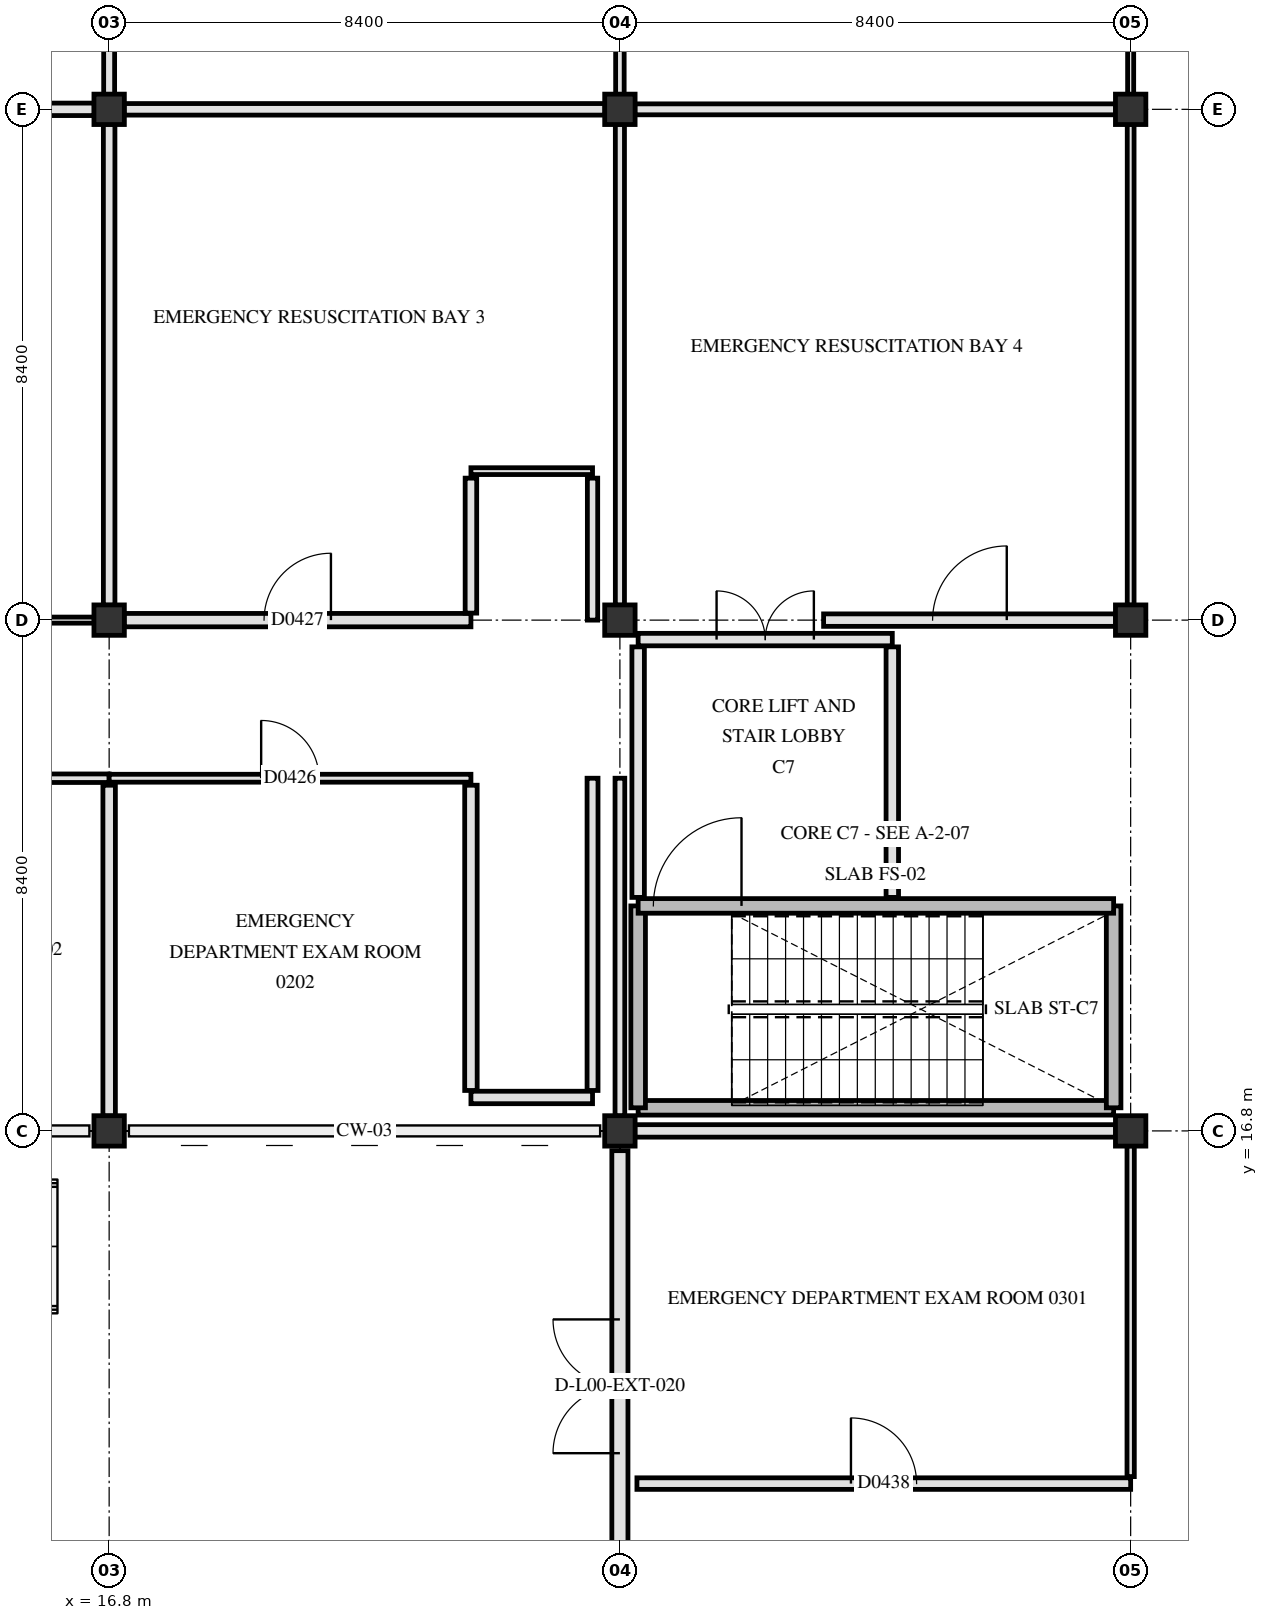
"""IFC4 building model, lengths in metres.
Left out: names, types, materials, properties, quantities, classifications, styles, units other than length and angle.
Written with IfcOpenShell. Run it as: python <this file> out.ifc"""

import sys

from ifc_helpers import new_model, si_unit, direction, frame, frame_2d, origin, origin_2d, place, context, subcontext, project, spatial, rectangle, extrude, element, fill, save


model = new_model("IFC4")
c1 = context("Model", 3, precision=1e-05, world=origin(), true_north=direction((0.0, 1.0)))
c2 = subcontext(c1, "Body", "Model", "MODEL_VIEW")
j1 = project(units=[si_unit("LENGTHUNIT", "METRE"), si_unit("PLANEANGLEUNIT", "RADIAN")], contexts=[c1])
p1 = place(None, origin())
s1 = spatial("IfcSite", under=j1, at=p1, CompositionType="ELEMENT")
p2 = place(p1, origin())
s2 = spatial("IfcBuilding", under=s1, at=p2, CompositionType="ELEMENT")
p3 = place(p2, origin())
s3 = spatial("IfcBuildingStorey", under=s2, at=p3, CompositionType="ELEMENT", Elevation=0.0)
for number, where, z_axis, x_axis in (
    (1, (16.8, 16.8, 0.0), (0.0, 0.0, 1.0), (1.0, 0.0, 0.0)),
    (2, (16.8, 25.2, 0.0), (0.0, 0.0, 1.0), (1.0, 0.0, 0.0)),
    (3, (16.8, 33.6, 0.0), (0.0, 0.0, 1.0), (1.0, 0.0, 0.0)),
    (4, (25.2, 16.8, 0.0), (0.0, 0.0, 1.0), (1.0, 0.0, 0.0)),
    (5, (25.2, 25.2, 0.0), (0.0, 0.0, 1.0), (1.0, 0.0, 0.0)),
    (6, (25.2, 33.6, 0.0), (0.0, 0.0, 1.0), (1.0, 0.0, 0.0)),
    (7, (33.6, 16.8, 0.0), (0.0, 0.0, 1.0), (1.0, 0.0, 0.0)),
    (8, (33.6, 25.2, 0.0), (0.0, 0.0, 1.0), (1.0, 0.0, 0.0)),
    (9, (33.6, 33.6, 0.0), (0.0, 0.0, 1.0), (1.0, 0.0, 0.0)),
):
    element("IfcColumn", number, at=place(p3, frame(where, z_axis=z_axis, x_axis=x_axis)), inside=s3, PredefinedType="COLUMN", context=c2, shape_type="SweptSolid", body=[
        extrude(rectangle(XDim=0.5, YDim=0.5, at=origin_2d()), origin(), (0.0, 0.0, 1.0), 4.8),
    ])
p4 = place(p3, frame((25.2, 8.725, 0.0), z_axis=(0.0, 0.0, 1.0), x_axis=(0.0, 1.0, 0.0)))
e10 = element("IfcWall", 10, at=p4, inside=s3, PredefinedType="SOLIDWALL", context=c2, shape_type="SweptSolid", body=[
    extrude(rectangle(XDim=7.75, YDim=0.265, at=frame_2d((3.875, 0.0))), origin(), (0.0, 0.0, 1.0), 2.99),
])
p5 = place(p4, frame((2.775, 0.0, 0.0)))
e11 = element("IfcOpeningElement", 11, at=p5, cuts=e10, PredefinedType="OPENING", context=c2, shape_type="SweptSolid", body=[
    extrude(rectangle(XDim=2.2, YDim=2.35, at=frame_2d((1.1, 1.175))), frame((0.0, 0.142, 0.0), z_axis=(0.0, -1.0, 0.0), x_axis=(1.0, 0.0, 0.0)), (0.0, 0.0, 1.0), 0.285),
])
p6 = place(p3, frame((25.5, 17.18, 0.0), z_axis=(0.0, 0.0, 1.0), x_axis=(1.0, 0.0, 0.0)))
e12 = element("IfcWall", 12, at=p6, inside=s3, PredefinedType="SHEAR", context=c2, shape_type="SweptSolid", body=[
    extrude(rectangle(XDim=7.82, YDim=0.24, at=frame_2d((3.91, 0.0))), origin(), (0.0, 0.0, 1.0), 4.5),
])
for number, where, z_axis, x_axis in (
    (13, (25.5, 17.18, 0.0), (0.0, 0.0, 1.0), (0.0, 1.0, 0.0)),
    (14, (33.32, 17.18, 0.0), (0.0, 0.0, 1.0), (0.0, 1.0, 0.0)),
):
    element("IfcWall", number, at=place(p3, frame(where, z_axis=z_axis, x_axis=x_axis)), inside=s3, PredefinedType="SHEAR", context=c2, shape_type="SweptSolid", body=[
        extrude(rectangle(XDim=3.32, YDim=0.24, at=frame_2d((1.66, 0.0))), origin(), (0.0, 0.0, 1.0), 4.5),
    ])
p7 = place(p3, frame((25.5, 20.5, 0.0), z_axis=(0.0, 0.0, 1.0), x_axis=(1.0, 0.0, 0.0)))
e15 = element("IfcWall", 15, at=p7, inside=s3, PredefinedType="SHEAR", context=c2, shape_type="SweptSolid", body=[
    extrude(rectangle(XDim=7.82, YDim=0.24, at=frame_2d((3.91, 0.0))), origin(), (0.0, 0.0, 1.0), 4.5),
])
p8 = place(p7, frame((0.25, 0.0, 0.0)))
e16 = element("IfcOpeningElement", 16, at=p8, cuts=e15, PredefinedType="OPENING", context=c2, shape_type="SweptSolid", body=[
    extrude(rectangle(XDim=1.45, YDim=2.2, at=frame_2d((0.725, 1.1))), frame((0.0, 0.13, 0.0), z_axis=(0.0, -1.0, 0.0), x_axis=(1.0, 0.0, 0.0)), (0.0, 0.0, 1.0), 0.26),
])
p9 = place(p3, frame((29.68, 20.64, 0.0), z_axis=(0.0, 0.0, 1.0), x_axis=(0.0, 1.0, 0.0)))
e17 = element("IfcWall", 17, at=p9, inside=s3, PredefinedType="PARTITIONING", context=c2, shape_type="SweptSolid", body=[
    extrude(rectangle(XDim=4.12, YDim=0.205, at=frame_2d((2.06, 0.0))), origin(), (0.0, 0.0, 1.0), 4.49),
])
p10 = place(p3, frame((25.5, 20.64, 0.0), z_axis=(0.0, 0.0, 1.0), x_axis=(0.0, 1.0, 0.0)))
e18 = element("IfcWall", 18, at=p10, inside=s3, PredefinedType="PARTITIONING", context=c2, shape_type="SweptSolid", body=[
    extrude(rectangle(XDim=4.12, YDim=0.205, at=frame_2d((2.06, 0.0))), origin(), (0.0, 0.0, 1.0), 3.89),
])
p11 = place(p3, frame((25.5, 24.88, 0.0), z_axis=(0.0, 0.0, 1.0), x_axis=(1.0, 0.0, 0.0)))
e19 = element("IfcWall", 19, at=p11, inside=s3, PredefinedType="PARTITIONING", context=c2, shape_type="SweptSolid", body=[
    extrude(rectangle(XDim=4.18, YDim=0.205, at=frame_2d((2.09, 0.0))), origin(), (0.0, 0.0, 1.0), 3.84),
])
p12 = place(p11, frame((1.29, 0.0, 0.0)))
e20 = element("IfcOpeningElement", 20, at=p12, cuts=e19, PredefinedType="OPENING", context=c2, shape_type="SweptSolid", body=[
    extrude(rectangle(XDim=1.6, YDim=2.25, at=frame_2d((0.8, 1.125))), frame((0.0, 0.113, 0.0), z_axis=(0.0, -1.0, 0.0), x_axis=(1.0, 0.0, 0.0)), (0.0, 0.0, 1.0), 0.225),
])
p13 = place(p3, frame((25.48, 11.0, 0.0), z_axis=(0.0, 0.0, 1.0), x_axis=(1.0, 0.0, 0.0)))
e21 = element("IfcWall", 21, at=p13, inside=s3, PredefinedType="PARTITIONING", context=c2, shape_type="SweptSolid", body=[
    extrude(rectangle(XDim=8.12, YDim=0.19, at=frame_2d((4.06, 0.0))), origin(), (0.0, 0.0, 1.0), 3.89),
])
p14 = place(p13, frame((3.52, 0.0, 0.0)))
e22 = element("IfcOpeningElement", 22, at=p14, cuts=e21, PredefinedType="OPENING", context=c2, shape_type="SweptSolid", body=[
    extrude(rectangle(XDim=1.08, YDim=2.12, at=frame_2d((0.54, 1.06))), frame((0.0, 0.105, 0.0), z_axis=(0.0, -1.0, 0.0), x_axis=(1.0, 0.0, 0.0)), (0.0, 0.0, 1.0), 0.21),
])
p15 = place(p3, frame((25.445, 16.8, 0.0), z_axis=(0.0, 0.0, 1.0), x_axis=(1.0, 0.0, 0.0)))
e23 = element("IfcWall", 23, at=p15, inside=s3, PredefinedType="PARTITIONING", context=c2, shape_type="SweptSolid", body=[
    extrude(rectangle(XDim=7.91, YDim=0.205, at=frame_2d((3.955, 0.0))), origin(), (0.0, 0.0, 1.0), 3.84),
])
p16 = place(p3, frame((22.75, 17.35, 0.0), z_axis=(0.0, 0.0, 1.0), x_axis=(1.0, 0.0, 0.0)))
e24 = element("IfcWall", 24, at=p16, inside=s3, PredefinedType="PARTITIONING", context=c2, shape_type="SweptSolid", body=[
    extrude(rectangle(XDim=2.0, YDim=0.205, at=frame_2d((1.0, 0.0))), origin(), (0.0, 0.0, 1.0), 4.49),
])
p17 = place(p3, frame((8.4, 22.6, 0.0), z_axis=(0.0, 0.0, 1.0), x_axis=(1.0, 0.0, 0.0)))
e25 = element("IfcWall", 25, at=p17, inside=s3, PredefinedType="PARTITIONING", context=c2, shape_type="SweptSolid", body=[
    extrude(rectangle(XDim=8.4, YDim=0.14, at=frame_2d((4.2, 0.0))), origin(), (0.0, 0.0, 1.0), 3.89),
])
p18 = place(p17, frame((3.51, 0.0, 0.0)))
e26 = element("IfcOpeningElement", 26, at=p18, cuts=e25, PredefinedType="OPENING", context=c2, shape_type="SweptSolid", body=[
    extrude(rectangle(XDim=1.38, YDim=2.22, at=frame_2d((0.69, 1.11))), frame((0.0, 0.08, 0.0), z_axis=(0.0, -1.0, 0.0), x_axis=(1.0, 0.0, 0.0)), (0.0, 0.0, 1.0), 0.16),
])
p19 = place(p3, frame((16.8, 22.6, 0.0), z_axis=(0.0, 0.0, 1.0), x_axis=(1.0, 0.0, 0.0)))
e27 = element("IfcWall", 27, at=p19, inside=s3, PredefinedType="PARTITIONING", context=c2, shape_type="SweptSolid", body=[
    extrude(rectangle(XDim=5.95, YDim=0.13, at=frame_2d((2.975, 0.0))), origin(), (0.0, 0.0, 1.0), 3.89),
])
p20 = place(p19, frame((2.5, 0.0, 0.0)))
e28 = element("IfcOpeningElement", 28, at=p20, cuts=e27, PredefinedType="OPENING", context=c2, shape_type="SweptSolid", body=[
    extrude(rectangle(XDim=0.95, YDim=2.1, at=frame_2d((0.475, 1.05))), frame((0.0, 0.075, 0.0), z_axis=(0.0, -1.0, 0.0), x_axis=(1.0, 0.0, 0.0)), (0.0, 0.0, 1.0), 0.15),
])
p21 = place(p3, frame((8.645, 25.2, 0.0), z_axis=(0.0, 0.0, 1.0), x_axis=(1.0, 0.0, 0.0)))
e29 = element("IfcWall", 29, at=p21, inside=s3, PredefinedType="PARTITIONING", context=c2, shape_type="SweptSolid", body=[
    extrude(rectangle(XDim=7.91, YDim=0.1, at=frame_2d((3.955, 0.0))), origin(), (0.0, 0.0, 1.0), 3.84),
])
p22 = place(p21, frame((3.245, 0.0, 0.0)))
e30 = element("IfcOpeningElement", 30, at=p22, cuts=e29, PredefinedType="OPENING", context=c2, shape_type="SweptSolid", body=[
    extrude(rectangle(XDim=1.42, YDim=2.22, at=frame_2d((0.71, 1.11))), frame((0.0, 0.06, 0.0), z_axis=(0.0, -1.0, 0.0), x_axis=(1.0, 0.0, 0.0)), (0.0, 0.0, 1.0), 0.12),
])
p23 = place(p3, frame((17.045, 25.2, 0.0), z_axis=(0.0, 0.0, 1.0), x_axis=(1.0, 0.0, 0.0)))
e31 = element("IfcWall", 31, at=p23, inside=s3, PredefinedType="PARTITIONING", context=c2, shape_type="SweptSolid", body=[
    extrude(rectangle(XDim=5.705, YDim=0.22, at=frame_2d((2.853, 0.0))), origin(), (0.0, 0.0, 1.0), 3.84),
])
p24 = place(p23, frame((2.302, 0.0, 0.0)))
e32 = element("IfcOpeningElement", 32, at=p24, cuts=e31, PredefinedType="OPENING", context=c2, shape_type="SweptSolid", body=[
    extrude(rectangle(XDim=1.1, YDim=2.15, at=frame_2d((0.55, 1.075))), frame((0.0, 0.12, 0.0), z_axis=(0.0, -1.0, 0.0), x_axis=(1.0, 0.0, 0.0)), (0.0, 0.0, 1.0), 0.24),
])
p25 = place(p3, frame((28.55, 25.2, 0.0), z_axis=(0.0, 0.0, 1.0), x_axis=(1.0, 0.0, 0.0)))
e33 = element("IfcWall", 33, at=p25, inside=s3, PredefinedType="PARTITIONING", context=c2, shape_type="SweptSolid", body=[
    extrude(rectangle(XDim=4.805, YDim=0.205, at=frame_2d((2.402, 0.0))), origin(), (0.0, 0.0, 1.0), 3.84),
])
p26 = place(p25, frame((1.792, 0.0, 0.0)))
e34 = element("IfcOpeningElement", 34, at=p26, cuts=e33, PredefinedType="OPENING", context=c2, shape_type="SweptSolid", body=[
    extrude(rectangle(XDim=1.22, YDim=2.18, at=frame_2d((0.61, 1.09))), frame((0.0, 0.113, 0.0), z_axis=(0.0, -1.0, 0.0), x_axis=(1.0, 0.0, 0.0)), (0.0, 0.0, 1.0), 0.225),
])
p27 = place(p3, frame((22.75, 27.65, 0.0), z_axis=(0.0, 0.0, 1.0), x_axis=(1.0, 0.0, 0.0)))
e35 = element("IfcWall", 35, at=p27, inside=s3, PredefinedType="PARTITIONING", context=c2, shape_type="SweptSolid", body=[
    extrude(rectangle(XDim=2.0, YDim=0.112, at=frame_2d((1.0, 0.0))), origin(), (0.0, 0.0, 1.0), 4.49),
])
p28 = place(p3, frame((8.645, 33.6, 0.0), z_axis=(0.0, 0.0, 1.0), x_axis=(1.0, 0.0, 0.0)))
e36 = element("IfcWall", 36, at=p28, inside=s3, PredefinedType="PARTITIONING", context=c2, shape_type="SweptSolid", body=[
    extrude(rectangle(XDim=7.91, YDim=0.205, at=frame_2d((3.955, 0.0))), origin(), (0.0, 0.0, 1.0), 3.84),
])
p29 = place(p3, frame((17.045, 33.6, 0.0), z_axis=(0.0, 0.0, 1.0), x_axis=(1.0, 0.0, 0.0)))
e37 = element("IfcWall", 37, at=p29, inside=s3, PredefinedType="PARTITIONING", context=c2, shape_type="SweptSolid", body=[
    extrude(rectangle(XDim=7.91, YDim=0.19, at=frame_2d((3.955, 0.0))), origin(), (0.0, 0.0, 1.0), 3.84),
])
p30 = place(p3, frame((25.445, 33.6, 0.0), z_axis=(0.0, 0.0, 1.0), x_axis=(1.0, 0.0, 0.0)))
e38 = element("IfcWall", 38, at=p30, inside=s3, PredefinedType="PARTITIONING", context=c2, shape_type="SweptSolid", body=[
    extrude(rectangle(XDim=7.91, YDim=0.18, at=frame_2d((3.955, 0.0))), origin(), (0.0, 0.0, 1.0), 3.84),
])
p31 = place(p3, frame((16.8, 17.045, 0.0), z_axis=(0.0, 0.0, 1.0), x_axis=(0.0, 1.0, 0.0)))
e39 = element("IfcWall", 39, at=p31, inside=s3, PredefinedType="PARTITIONING", context=c2, shape_type="SweptSolid", body=[
    extrude(rectangle(XDim=5.44, YDim=0.205, at=frame_2d((2.72, 0.0))), origin(), (0.0, 0.0, 1.0), 3.89),
])
p32 = place(p3, frame((16.8, 25.445, 0.0), z_axis=(0.0, 0.0, 1.0), x_axis=(0.0, 1.0, 0.0)))
e40 = element("IfcWall", 40, at=p32, inside=s3, PredefinedType="PARTITIONING", context=c2, shape_type="SweptSolid", body=[
    extrude(rectangle(XDim=7.91, YDim=0.19, at=frame_2d((3.955, 0.0))), origin(), (0.0, 0.0, 1.0), 3.89),
])
p33 = place(p3, frame((16.8, 33.845, 0.0), z_axis=(0.0, 0.0, 1.0), x_axis=(0.0, 1.0, 0.0)))
e41 = element("IfcWall", 41, at=p33, inside=s3, PredefinedType="PARTITIONING", context=c2, shape_type="SweptSolid", body=[
    extrude(rectangle(XDim=7.91, YDim=0.18, at=frame_2d((3.955, 0.0))), origin(), (0.0, 0.0, 1.0), 3.89),
])
p34 = place(p3, frame((22.75, 17.465, 0.0), z_axis=(0.0, 0.0, 1.0), x_axis=(0.0, 1.0, 0.0)))
e42 = element("IfcWall", 42, at=p34, inside=s3, PredefinedType="PARTITIONING", context=c2, shape_type="SweptSolid", body=[
    extrude(rectangle(XDim=5.02, YDim=0.205, at=frame_2d((2.51, 0.0))), origin(), (0.0, 0.0, 1.0), 4.49),
])
p35 = place(p3, frame((22.75, 25.315, 0.0), z_axis=(0.0, 0.0, 1.0), x_axis=(0.0, 1.0, 0.0)))
e43 = element("IfcWall", 43, at=p35, inside=s3, PredefinedType="PARTITIONING", context=c2, shape_type="SweptSolid", body=[
    extrude(rectangle(XDim=2.22, YDim=0.19, at=frame_2d((1.11, 0.0))), origin(), (0.0, 0.0, 1.0), 3.84),
])
p36 = place(p3, frame((24.75, 17.465, 0.0), z_axis=(0.0, 0.0, 1.0), x_axis=(0.0, 1.0, 0.0)))
e44 = element("IfcWall", 44, at=p36, inside=s3, PredefinedType="PARTITIONING", context=c2, shape_type="SweptSolid", body=[
    extrude(rectangle(XDim=5.135, YDim=0.18, at=frame_2d((2.567, 0.0))), origin(), (0.0, 0.0, 1.0), 4.49),
])
p37 = place(p3, frame((24.75, 25.2, 0.0), z_axis=(0.0, 0.0, 1.0), x_axis=(0.0, 1.0, 0.0)))
e45 = element("IfcWall", 45, at=p37, inside=s3, PredefinedType="PARTITIONING", context=c2, shape_type="SweptSolid", body=[
    extrude(rectangle(XDim=2.335, YDim=0.17, at=frame_2d((1.167, 0.0))), origin(), (0.0, 0.0, 1.0), 3.84),
])
p38 = place(p3, frame((25.2, 17.045, 0.0), z_axis=(0.0, 0.0, 1.0), x_axis=(0.0, 1.0, 0.0)))
e46 = element("IfcWall", 46, at=p38, inside=s3, PredefinedType="PARTITIONING", context=c2, shape_type="SweptSolid", body=[
    extrude(rectangle(XDim=5.555, YDim=0.16, at=frame_2d((2.778, 0.0))), origin(), (0.0, 0.0, 1.0), 3.89),
])
p39 = place(p3, frame((25.2, 25.445, 0.0), z_axis=(0.0, 0.0, 1.0), x_axis=(0.0, 1.0, 0.0)))
e47 = element("IfcWall", 47, at=p39, inside=s3, PredefinedType="PARTITIONING", context=c2, shape_type="SweptSolid", body=[
    extrude(rectangle(XDim=7.91, YDim=0.15, at=frame_2d((3.955, 0.0))), origin(), (0.0, 0.0, 1.0), 3.89),
])
p40 = place(p3, frame((25.2, 33.845, 0.0), z_axis=(0.0, 0.0, 1.0), x_axis=(0.0, 1.0, 0.0)))
e48 = element("IfcWall", 48, at=p40, inside=s3, PredefinedType="PARTITIONING", context=c2, shape_type="SweptSolid", body=[
    extrude(rectangle(XDim=7.91, YDim=0.14, at=frame_2d((3.955, 0.0))), origin(), (0.0, 0.0, 1.0), 3.89),
])
p41 = place(p3, frame((33.6, 11.115, 0.0), z_axis=(0.0, 0.0, 1.0), x_axis=(0.0, 1.0, 0.0)))
e49 = element("IfcWall", 49, at=p41, inside=s3, PredefinedType="PARTITIONING", context=c2, shape_type="SweptSolid", body=[
    extrude(rectangle(XDim=5.44, YDim=0.12, at=frame_2d((2.72, 0.0))), origin(), (0.0, 0.0, 1.0), 3.89),
])
p42 = place(p3, frame((33.6, 25.445, 0.0), z_axis=(0.0, 0.0, 1.0), x_axis=(0.0, 1.0, 0.0)))
e50 = element("IfcWall", 50, at=p42, inside=s3, PredefinedType="PARTITIONING", context=c2, shape_type="SweptSolid", body=[
    extrude(rectangle(XDim=7.91, YDim=0.112, at=frame_2d((3.955, 0.0))), origin(), (0.0, 0.0, 1.0), 3.89),
])
p43 = place(p3, frame((33.6, 33.845, 0.0), z_axis=(0.0, 0.0, 1.0), x_axis=(0.0, 1.0, 0.0)))
e51 = element("IfcWall", 51, at=p43, inside=s3, PredefinedType="PARTITIONING", context=c2, shape_type="SweptSolid", body=[
    extrude(rectangle(XDim=7.91, YDim=0.1, at=frame_2d((3.955, 0.0))), origin(), (0.0, 0.0, 1.0), 3.89),
])
p44 = place(p5, origin())
e52 = element("IfcDoor", 52, at=p44, inside=s3, OperationType="DOUBLE_SWING_LEFT", PredefinedType="DOOR", context=c2, shape_type="SweptSolid", body=[
    extrude(rectangle(XDim=2.2, YDim=2.35, at=frame_2d((1.1, 1.175))), frame((0.0, 0.025, 0.0), z_axis=(0.0, -1.0, 0.0), x_axis=(1.0, 0.0, 0.0)), (0.0, 0.0, 1.0), 0.05),
])
fill(e11, e52)
p45 = place(p8, origin())
e53 = element("IfcDoor", 53, at=p45, inside=s3, OperationType="SINGLE_SWING_RIGHT", PredefinedType="DOOR", context=c2, shape_type="SweptSolid", body=[
    extrude(rectangle(XDim=1.45, YDim=2.2, at=frame_2d((0.725, 1.1))), frame((0.0, 0.025, 0.0), z_axis=(0.0, -1.0, 0.0), x_axis=(1.0, 0.0, 0.0)), (0.0, 0.0, 1.0), 0.05),
])
fill(e16, e53)
p46 = place(p12, origin())
e54 = element("IfcDoor", 54, at=p46, inside=s3, OperationType="DOUBLE_SWING_LEFT", PredefinedType="DOOR", context=c2, shape_type="SweptSolid", body=[
    extrude(rectangle(XDim=1.6, YDim=2.25, at=frame_2d((0.8, 1.125))), frame((0.0, 0.025, 0.0), z_axis=(0.0, -1.0, 0.0), x_axis=(1.0, 0.0, 0.0)), (0.0, 0.0, 1.0), 0.05),
])
fill(e20, e54)
p47 = place(p20, origin())
e55 = element("IfcDoor", 55, at=p47, inside=s3, OperationType="SINGLE_SWING_LEFT", PredefinedType="DOOR", context=c2, shape_type="SweptSolid", body=[
    extrude(rectangle(XDim=0.95, YDim=2.1, at=frame_2d((0.475, 1.05))), frame((0.0, 0.025, 0.0), z_axis=(0.0, -1.0, 0.0), x_axis=(1.0, 0.0, 0.0)), (0.0, 0.0, 1.0), 0.05),
])
fill(e28, e55)
p48 = place(p24, origin())
e56 = element("IfcDoor", 56, at=p48, inside=s3, OperationType="SINGLE_SWING_RIGHT", PredefinedType="DOOR", context=c2, shape_type="SweptSolid", body=[
    extrude(rectangle(XDim=1.1, YDim=2.15, at=frame_2d((0.55, 1.075))), frame((0.0, 0.025, 0.0), z_axis=(0.0, -1.0, 0.0), x_axis=(1.0, 0.0, 0.0)), (0.0, 0.0, 1.0), 0.05),
])
fill(e32, e56)
p49 = place(p14, origin())
e57 = element("IfcDoor", 57, at=p49, inside=s3, OperationType="SINGLE_SWING_LEFT", PredefinedType="DOOR", context=c2, shape_type="SweptSolid", body=[
    extrude(rectangle(XDim=1.08, YDim=2.12, at=frame_2d((0.54, 1.06))), frame((0.0, 0.025, 0.0), z_axis=(0.0, -1.0, 0.0), x_axis=(1.0, 0.0, 0.0)), (0.0, 0.0, 1.0), 0.05),
])
fill(e22, e57)
p50 = place(p26, origin())
e58 = element("IfcDoor", 58, at=p50, inside=s3, OperationType="SINGLE_SWING_RIGHT", PredefinedType="DOOR", context=c2, shape_type="SweptSolid", body=[
    extrude(rectangle(XDim=1.22, YDim=2.18, at=frame_2d((0.61, 1.09))), frame((0.0, 0.025, 0.0), z_axis=(0.0, -1.0, 0.0), x_axis=(1.0, 0.0, 0.0)), (0.0, 0.0, 1.0), 0.05),
])
fill(e34, e58)
save(model, sys.argv[1])
